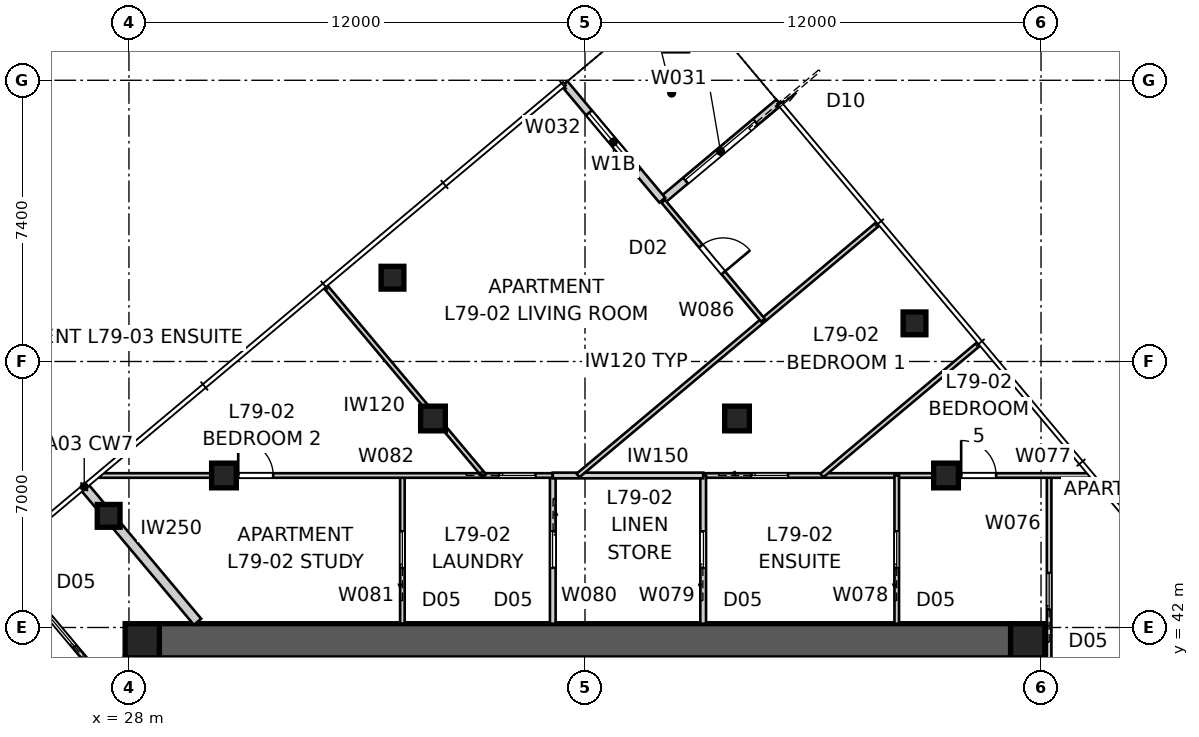
"""IFC4 building model, lengths in metres.
Left out: names, types, materials, properties, quantities, classifications, styles, units other than length and angle.
Written with IfcOpenShell. Run it as: python <this file> out.ifc"""

import sys

from ifc_helpers import new_model, si_unit, direction, frame, frame_2d, origin, origin_2d, place, context, subcontext, project, spatial, polyline, rectangle, outline, extrude, element, fill, save


model = new_model("IFC4")
c1 = context("Model", 3, precision=1e-05, world=origin(), true_north=direction((0.0, 1.0)))
c2 = subcontext(c1, "Body", "Model", "MODEL_VIEW")
j1 = project(units=[si_unit("LENGTHUNIT", "METRE"), si_unit("PLANEANGLEUNIT", "RADIAN")], contexts=[c1])
p1 = place(None, origin())
s1 = spatial("IfcSite", under=j1, at=p1, CompositionType="ELEMENT")
p2 = place(p1, origin())
s2 = spatial("IfcBuilding", under=s1, at=p2, CompositionType="ELEMENT")
p3 = place(p2, frame((0.0, 0.0, 286.2)))
s3 = spatial("IfcBuildingStorey", under=s2, at=p3, CompositionType="ELEMENT", Elevation=286.2)
p4 = place(p3, frame((28.8, 41.65, 0.0), z_axis=(0.0, 0.0, 1.0), x_axis=(1.0, 0.0, 0.0)))
e1 = element("IfcWall", 1, at=p4, inside=s3, PredefinedType="SHEAR", context=c2, shape_type="SweptSolid", body=[
    extrude(outline(polyline([(0.0, -0.45), (22.4, -0.45), (22.4, -0.025), (22.85, -0.025), (22.85, 0.025), (22.4, 0.025), (22.4, 0.45), (0.0, 0.45), (0.0, 0.025), (-0.45, 0.025), (-0.45, -0.025), (0.0, -0.025), (0.0, -0.45)])), origin(), (0.0, 0.0, 1.0), 3.4),
])
p5 = place(p3, frame((51.65, 18.8, 0.0), z_axis=(0.0, 0.0, 1.0), x_axis=(0.0, 1.0, 0.0)))
e2 = element("IfcWall", 2, at=p5, inside=s3, PredefinedType="SHEAR", context=c2, shape_type="SweptSolid", body=[
    extrude(outline(polyline([(0.0, -0.45), (22.4, -0.45), (22.4, -0.025), (22.85, -0.025), (22.85, 0.025), (22.4, 0.025), (22.4, 0.45), (0.0, 0.45), (0.0, 0.025), (-0.45, 0.025), (-0.45, -0.025), (0.0, -0.025), (0.0, -0.45)])), origin(), (0.0, 0.0, 1.0), 3.4),
])
p6 = place(p5, frame((11.14, 0.0, 0.0)))
e3 = element("IfcOpeningElement", 3, at=p6, cuts=e2, PredefinedType="OPENING", context=c2, shape_type="SweptSolid", body=[
    extrude(rectangle(XDim=1.02, YDim=2.4, at=frame_2d((0.51, 1.2))), frame((0.0, 0.46, 0.0), z_axis=(0.0, -1.0, 0.0), x_axis=(1.0, 0.0, 0.0)), (0.0, 0.0, 1.0), 0.92),
])
p7 = place(p3, frame((28.35, 41.2, 0.0), z_axis=(0.0, 0.0, 1.0), x_axis=(0.0, -1.0, 0.0)))
e4 = element("IfcWall", 4, at=p7, inside=s3, PredefinedType="SHEAR", context=c2, shape_type="SweptSolid", body=[
    extrude(outline(polyline([(0.0, -0.45), (22.4, -0.45), (22.4, -0.025), (22.85, -0.025), (22.85, 0.025), (22.4, 0.025), (22.4, 0.45), (0.0, 0.45), (0.0, 0.025), (-0.45, 0.025), (-0.45, -0.025), (0.0, -0.025), (0.0, -0.45)])), origin(), (0.0, 0.0, 1.0), 3.4),
])
p8 = place(p7, frame((11.14, 0.0, 0.0)))
e5 = element("IfcOpeningElement", 5, at=p8, cuts=e4, PredefinedType="OPENING", context=c2, shape_type="SweptSolid", body=[
    extrude(rectangle(XDim=1.02, YDim=2.4, at=frame_2d((0.51, 1.2))), frame((0.0, 0.46, 0.0), z_axis=(0.0, -1.0, 0.0), x_axis=(1.0, 0.0, 0.0)), (0.0, 0.0, 1.0), 0.92),
])
for number, where, z_axis, x_axis in (
    (6, (51.65, 41.65, 0.0), (0.0, 0.0, 1.0), (1.0, 0.0, 0.0)),
    (7, (28.35, 41.65, 0.0), (0.0, 0.0, 1.0), (1.0, 0.0, 0.0)),
):
    element("IfcColumn", number, at=place(p3, frame(where, z_axis=z_axis, x_axis=x_axis)), inside=s3, PredefinedType="COLUMN", context=c2, shape_type="SweptSolid", body=[
        extrude(rectangle(XDim=0.9, YDim=0.9, at=origin_2d()), origin(), (0.0, 0.0, 1.0), 3.4),
    ])
for number, where, z_axis, x_axis in (
    (8, (48.671, 50.003, 0.0), (0.0, 0.0, 1.0), (1.0, 0.0, 0.0)),
    (9, (34.935, 51.205, 0.0), (0.0, 0.0, 1.0), (1.0, 0.0, 0.0)),
    (10, (27.466, 44.938, 0.0), (0.0, 0.0, 1.0), (1.0, 0.0, 0.0)),
):
    element("IfcColumn", number, at=place(p3, frame(where, z_axis=z_axis, x_axis=x_axis)), inside=s3, PredefinedType="COLUMN", context=c2, shape_type="SweptSolid", body=[
        extrude(rectangle(XDim=0.6, YDim=0.6, at=origin_2d()), origin(), (0.0, 0.0, 1.0), 3.4),
    ])
for number, where, z_axis, x_axis in (
    (11, (49.5, 46.0, 0.0), (0.0, 0.0, 1.0), (1.0, 0.0, 0.0)),
    (12, (44.0, 47.5, 0.0), (0.0, 0.0, 1.0), (1.0, 0.0, 0.0)),
    (13, (36.0, 47.5, 0.0), (0.0, 0.0, 1.0), (1.0, 0.0, 0.0)),
    (14, (30.5, 46.0, 0.0), (0.0, 0.0, 1.0), (1.0, 0.0, 0.0)),
):
    element("IfcColumn", number, at=place(p3, frame(where, z_axis=z_axis, x_axis=x_axis)), inside=s3, PredefinedType="COLUMN", context=c2, shape_type="SweptSolid", body=[
        extrude(rectangle(XDim=0.65, YDim=0.65, at=origin_2d()), origin(), (0.0, 0.0, 1.0), 3.4),
    ])
p9 = place(p3, frame((45.098, 55.817, 0.0), z_axis=(0.0, 0.0, 1.0), x_axis=(-0.766060656284, -0.642768287094, 0.0)))
e15 = element("IfcWall", 15, at=p9, inside=s3, PredefinedType="SOLIDWALL", context=c2, shape_type="SweptSolid", body=[
    extrude(rectangle(XDim=4.0, YDim=0.2, at=frame_2d((2.0, 0.0))), origin(), (0.0, 0.0, 1.0), 3.25),
])
p10 = place(p9, frame((0.8, 0.0, 0.0)))
e16 = element("IfcOpeningElement", 16, at=p10, cuts=e15, PredefinedType="OPENING", context=c2, shape_type="SweptSolid", body=[
    extrude(rectangle(XDim=2.4, YDim=2.4, at=frame_2d((1.2, 1.2))), frame((0.0, 0.11, 0.0), z_axis=(0.0, -1.0, 0.0), x_axis=(1.0, 0.0, 0.0)), (0.0, 0.0, 1.0), 0.22),
])
p11 = place(p3, frame((42.034, 53.246, 0.0), z_axis=(0.0, 0.0, 1.0), x_axis=(-0.642798342015, 0.766035437498, 0.0)))
e17 = element("IfcWall", 17, at=p11, inside=s3, PredefinedType="SOLIDWALL", context=c2, shape_type="SweptSolid", body=[
    extrude(rectangle(XDim=4.0, YDim=0.2, at=frame_2d((2.0, 0.0))), origin(), (0.0, 0.0, 1.0), 3.25),
])
p12 = place(p11, frame((1.0, 0.0, 0.45)))
e18 = element("IfcOpeningElement", 18, at=p12, cuts=e17, PredefinedType="OPENING", context=c2, shape_type="SweptSolid", body=[
    extrude(rectangle(XDim=2.0, YDim=1.8, at=frame_2d((1.0, 0.9))), frame((0.0, 0.11, 0.0), z_axis=(0.0, -1.0, 0.0), x_axis=(1.0, 0.0, 0.0)), (0.0, 0.0, 1.0), 0.22),
])
p13 = place(p3, frame((26.823, 45.704, 0.0), z_axis=(0.0, 0.0, 1.0), x_axis=(0.64279957712, -0.76603440109, 0.0)))
e19 = element("IfcWall", 19, at=p13, inside=s3, PredefinedType="PARTITIONING", context=c2, shape_type="SweptSolid", body=[
    extrude(rectangle(XDim=4.64, YDim=0.25, at=frame_2d((2.32, 0.0))), origin(), (0.0, 0.0, 1.0), 3.25),
])
p14 = place(p3, frame((52.213, 39.914, 0.0), z_axis=(0.0, 0.0, 1.0), x_axis=(0.0, 1.0, 0.0)))
e20 = element("IfcWall", 20, at=p14, inside=s3, PredefinedType="PARTITIONING", context=c2, shape_type="SweptSolid", body=[
    extrude(rectangle(XDim=6.086, YDim=0.12, at=frame_2d((3.043, 0.0))), origin(), (0.0, 0.0, 1.0), 3.25),
])
p15 = place(p14, frame((2.563, 0.0, 0.0)))
e21 = element("IfcOpeningElement", 21, at=p15, cuts=e20, PredefinedType="OPENING", context=c2, shape_type="SweptSolid", body=[
    extrude(rectangle(XDim=0.96, YDim=2.1, at=frame_2d((0.48, 1.05))), frame((0.0, 0.07, 0.0), z_axis=(0.0, -1.0, 0.0), x_axis=(1.0, 0.0, 0.0)), (0.0, 0.0, 1.0), 0.14),
])
p16 = place(p3, frame((43.11, 46.0, 0.0), z_axis=(0.0, 0.0, 1.0), x_axis=(1.0, 0.0, 0.0)))
e22 = element("IfcWall", 22, at=p16, inside=s3, PredefinedType="PARTITIONING", context=c2, shape_type="SweptSolid", body=[
    extrude(rectangle(XDim=10.173, YDim=0.12, at=frame_2d((5.086, 0.0))), origin(), (0.0, 0.0, 1.0), 2.55),
])
p17 = place(p16, frame((6.788, 0.0, 0.0)))
e23 = element("IfcOpeningElement", 23, at=p17, cuts=e22, PredefinedType="OPENING", context=c2, shape_type="SweptSolid", body=[
    extrude(rectangle(XDim=0.92, YDim=2.34, at=frame_2d((0.46, 1.17))), frame((0.0, 0.07, 0.0), z_axis=(0.0, -1.0, 0.0), x_axis=(1.0, 0.0, 0.0)), (0.0, 0.0, 1.0), 0.14),
])
p18 = place(p16, frame((1.271, 0.0, 0.0)))
e24 = element("IfcOpeningElement", 24, at=p18, cuts=e22, PredefinedType="OPENING", context=c2, shape_type="SweptSolid", body=[
    extrude(rectangle(XDim=0.96, YDim=2.1, at=frame_2d((0.48, 1.05))), frame((0.0, 0.07, 0.0), z_axis=(0.0, -1.0, 0.0), x_axis=(1.0, 0.0, 0.0)), (0.0, 0.0, 1.0), 0.14),
])
p19 = place(p3, frame((48.203, 42.1, 0.0), z_axis=(0.0, 0.0, 1.0), x_axis=(0.0, 1.0, 0.0)))
e25 = element("IfcWall", 25, at=p19, inside=s3, PredefinedType="PARTITIONING", context=c2, shape_type="SweptSolid", body=[
    extrude(rectangle(XDim=3.9, YDim=0.12, at=frame_2d((1.95, 0.0))), origin(), (0.0, 0.0, 1.0), 3.25),
])
p20 = place(p19, frame((1.47, 0.0, 0.0)))
e26 = element("IfcOpeningElement", 26, at=p20, cuts=e25, PredefinedType="OPENING", context=c2, shape_type="SweptSolid", body=[
    extrude(rectangle(XDim=0.96, YDim=2.1, at=frame_2d((0.48, 1.05))), frame((0.0, 0.07, 0.0), z_axis=(0.0, -1.0, 0.0), x_axis=(1.0, 0.0, 0.0)), (0.0, 0.0, 1.0), 0.14),
])
p21 = place(p3, frame((43.11, 42.1, 0.0), z_axis=(0.0, 0.0, 1.0), x_axis=(0.0, 1.0, 0.0)))
e27 = element("IfcWall", 27, at=p21, inside=s3, PredefinedType="SOLIDWALL", context=c2, shape_type="SweptSolid", body=[
    extrude(rectangle(XDim=3.9, YDim=0.15, at=frame_2d((1.95, 0.0))), origin(), (0.0, 0.0, 1.0), 3.25),
])
p22 = place(p21, frame((1.47, 0.0, 0.0)))
e28 = element("IfcOpeningElement", 28, at=p22, cuts=e27, PredefinedType="OPENING", context=c2, shape_type="SweptSolid", body=[
    extrude(rectangle(XDim=0.96, YDim=2.1, at=frame_2d((0.48, 1.05))), frame((0.0, 0.085, 0.0), z_axis=(0.0, -1.0, 0.0), x_axis=(1.0, 0.0, 0.0)), (0.0, 0.0, 1.0), 0.17),
])
p23 = place(p3, frame((39.153, 46.0, 0.0), z_axis=(0.0, 0.0, 1.0), x_axis=(0.0, -1.0, 0.0)))
e29 = element("IfcWall", 29, at=p23, inside=s3, PredefinedType="SOLIDWALL", context=c2, shape_type="SweptSolid", body=[
    extrude(rectangle(XDim=3.9, YDim=0.15, at=frame_2d((1.95, 0.0))), origin(), (0.0, 0.0, 1.0), 3.25),
])
p24 = place(p23, frame((1.47, 0.0, 0.0)))
e30 = element("IfcOpeningElement", 30, at=p24, cuts=e29, PredefinedType="OPENING", context=c2, shape_type="SweptSolid", body=[
    extrude(rectangle(XDim=0.96, YDim=2.1, at=frame_2d((0.48, 1.05))), frame((0.0, 0.085, 0.0), z_axis=(0.0, -1.0, 0.0), x_axis=(1.0, 0.0, 0.0)), (0.0, 0.0, 1.0), 0.17),
])
p25 = place(p3, frame((35.195, 42.1, 0.0), z_axis=(0.0, 0.0, 1.0), x_axis=(0.0, 1.0, 0.0)))
e31 = element("IfcWall", 31, at=p25, inside=s3, PredefinedType="PARTITIONING", context=c2, shape_type="SweptSolid", body=[
    extrude(rectangle(XDim=3.9, YDim=0.12, at=frame_2d((1.95, 0.0))), origin(), (0.0, 0.0, 1.0), 3.25),
])
p26 = place(p25, frame((1.47, 0.0, 0.0)))
e32 = element("IfcOpeningElement", 32, at=p26, cuts=e31, PredefinedType="OPENING", context=c2, shape_type="SweptSolid", body=[
    extrude(rectangle(XDim=0.96, YDim=2.1, at=frame_2d((0.48, 1.05))), frame((0.0, 0.07, 0.0), z_axis=(0.0, -1.0, 0.0), x_axis=(1.0, 0.0, 0.0)), (0.0, 0.0, 1.0), 0.14),
])
p27 = place(p3, frame((27.238, 46.0, 0.0), z_axis=(0.0, 0.0, 1.0), x_axis=(1.0, 0.0, 0.0)))
e33 = element("IfcWall", 33, at=p27, inside=s3, PredefinedType="PARTITIONING", context=c2, shape_type="SweptSolid", body=[
    extrude(rectangle(XDim=11.915, YDim=0.12, at=frame_2d((5.957, 0.0))), origin(), (0.0, 0.0, 1.0), 2.55),
])
p28 = place(p27, frame((3.637, 0.0, 0.0)))
e34 = element("IfcOpeningElement", 34, at=p28, cuts=e33, PredefinedType="OPENING", context=c2, shape_type="SweptSolid", body=[
    extrude(rectangle(XDim=0.92, YDim=2.34, at=frame_2d((0.46, 1.17))), frame((0.0, 0.07, 0.0), z_axis=(0.0, -1.0, 0.0), x_axis=(1.0, 0.0, 0.0)), (0.0, 0.0, 1.0), 0.14),
])
p29 = place(p27, frame((10.498, 0.0, 0.0)))
e35 = element("IfcOpeningElement", 35, at=p29, cuts=e33, PredefinedType="OPENING", context=c2, shape_type="SweptSolid", body=[
    extrude(rectangle(XDim=0.96, YDim=2.1, at=frame_2d((0.48, 1.05))), frame((0.0, 0.07, 0.0), z_axis=(0.0, -1.0, 0.0), x_axis=(1.0, 0.0, 0.0)), (0.0, 0.0, 1.0), 0.14),
])
p30 = place(p3, frame((39.153, 46.0, 0.0), z_axis=(0.0, 0.0, 1.0), x_axis=(1.0, 0.0, 0.0)))
e36 = element("IfcWall", 36, at=p30, inside=s3, PredefinedType="SOLIDWALL", context=c2, shape_type="SweptSolid", body=[
    extrude(rectangle(XDim=3.958, YDim=0.15, at=frame_2d((1.979, 0.0))), origin(), (0.0, 0.0, 1.0), 3.25),
])
p31 = place(p3, frame((47.719, 52.631, 0.0), z_axis=(0.0, 0.0, 1.0), x_axis=(-0.766052076481, -0.64277851249, 0.0)))
e37 = element("IfcWall", 37, at=p31, inside=s3, PredefinedType="PARTITIONING", context=c2, shape_type="SweptSolid", body=[
    extrude(rectangle(XDim=10.316, YDim=0.12, at=frame_2d((5.158, 0.0))), origin(), (0.0, 0.0, 1.0), 3.25),
])
p32 = place(p3, frame((37.344, 46.0, 0.0), z_axis=(0.0, 0.0, 1.0), x_axis=(-0.642779498388, 0.766051249233, 0.0)))
e38 = element("IfcWall", 38, at=p32, inside=s3, PredefinedType="PARTITIONING", context=c2, shape_type="SweptSolid", body=[
    extrude(rectangle(XDim=6.496, YDim=0.12, at=frame_2d((3.248, 0.0))), origin(), (0.0, 0.0, 1.0), 3.25),
])
p33 = place(p3, frame((42.06, 53.215, 0.0), z_axis=(0.0, 0.0, 1.0), x_axis=(0.642796729538, -0.766036790562, 0.0)))
e39 = element("IfcWall", 39, at=p33, inside=s3, PredefinedType="PARTITIONING", context=c2, shape_type="SweptSolid", body=[
    extrude(rectangle(XDim=4.085, YDim=0.12, at=frame_2d((2.042, 0.0))), origin(), (0.0, 0.0, 1.0), 3.25),
])
p34 = place(p33, frame((1.538, 0.0, 0.0)))
e40 = element("IfcOpeningElement", 40, at=p34, cuts=e39, PredefinedType="OPENING", context=c2, shape_type="SweptSolid", body=[
    extrude(rectangle(XDim=0.92, YDim=2.34, at=frame_2d((0.46, 1.17))), frame((0.0, 0.07, 0.0), z_axis=(0.0, -1.0, 0.0), x_axis=(1.0, 0.0, 0.0)), (0.0, 0.0, 1.0), 0.14),
])
p35 = place(p3, frame((50.37, 49.471, 0.0), z_axis=(0.0, 0.0, 1.0), x_axis=(-0.766056536168, -0.642773197476, 0.0)))
e41 = element("IfcWall", 41, at=p35, inside=s3, PredefinedType="PARTITIONING", context=c2, shape_type="SweptSolid", body=[
    extrude(rectangle(XDim=5.4, YDim=0.12, at=frame_2d((2.7, 0.0))), origin(), (0.0, 0.0, 1.0), 3.25),
])
p36 = place(p3, frame((27.9, 39.913, 0.0), z_axis=(0.0, 0.0, 1.0), x_axis=(-0.64279031777, 0.766042170759, 0.0)))
e42 = element("IfcWall", 42, at=p36, inside=s3, PredefinedType="PARTITIONING", context=c2, shape_type="SweptSolid", body=[
    extrude(rectangle(XDim=5.089, YDim=0.12, at=frame_2d((2.544, 0.0))), origin(), (0.0, 0.0, 1.0), 3.25),
])
p37 = place(p36, frame((2.084, 0.0, 0.0)))
e43 = element("IfcOpeningElement", 43, at=p37, cuts=e42, PredefinedType="OPENING", context=c2, shape_type="SweptSolid", body=[
    extrude(rectangle(XDim=0.96, YDim=2.1, at=frame_2d((0.48, 1.05))), frame((0.0, 0.07, 0.0), z_axis=(0.0, -1.0, 0.0), x_axis=(1.0, 0.0, 0.0)), (0.0, 0.0, 1.0), 0.14),
])
p38 = place(p10, origin())
e44 = element("IfcDoor", 44, at=p38, inside=s3, OperationType="SLIDING_TO_LEFT", PredefinedType="DOOR", context=c2, shape_type="SweptSolid", body=[
    extrude(rectangle(XDim=2.4, YDim=2.4, at=frame_2d((1.2, 1.2))), frame((0.0, 0.025, 0.0), z_axis=(0.0, -1.0, 0.0), x_axis=(1.0, 0.0, 0.0)), (0.0, 0.0, 1.0), 0.05),
])
fill(e16, e44)
p39 = place(p12, origin())
e45 = element("IfcWindow", 45, at=p39, inside=s3, PartitioningType="SINGLE_PANEL", PredefinedType="WINDOW", context=c2, shape_type="SweptSolid", body=[
    extrude(rectangle(XDim=2.0, YDim=1.8, at=frame_2d((1.0, 0.9))), frame((0.0, 0.03, 0.0), z_axis=(0.0, -1.0, 0.0), x_axis=(1.0, 0.0, 0.0)), (0.0, 0.0, 1.0), 0.06),
])
fill(e18, e45)
p40 = place(p15, origin())
e46 = element("IfcDoor", 46, at=p40, inside=s3, OperationType="SLIDING_TO_LEFT", PredefinedType="DOOR", context=c2, shape_type="SweptSolid", body=[
    extrude(rectangle(XDim=0.96, YDim=2.1, at=frame_2d((0.48, 1.05))), frame((0.0, 0.025, 0.0), z_axis=(0.0, -1.0, 0.0), x_axis=(1.0, 0.0, 0.0)), (0.0, 0.0, 1.0), 0.05),
])
fill(e21, e46)
p41 = place(p17, origin())
e47 = element("IfcDoor", 47, at=p41, inside=s3, OperationType="SINGLE_SWING_LEFT", PredefinedType="DOOR", context=c2, shape_type="SweptSolid", body=[
    extrude(rectangle(XDim=0.92, YDim=2.34, at=frame_2d((0.46, 1.17))), frame((0.0, 0.025, 0.0), z_axis=(0.0, -1.0, 0.0), x_axis=(1.0, 0.0, 0.0)), (0.0, 0.0, 1.0), 0.05),
])
fill(e23, e47)
p42 = place(p20, origin())
e48 = element("IfcDoor", 48, at=p42, inside=s3, OperationType="SLIDING_TO_LEFT", PredefinedType="DOOR", context=c2, shape_type="SweptSolid", body=[
    extrude(rectangle(XDim=0.96, YDim=2.1, at=frame_2d((0.48, 1.05))), frame((0.0, 0.025, 0.0), z_axis=(0.0, -1.0, 0.0), x_axis=(1.0, 0.0, 0.0)), (0.0, 0.0, 1.0), 0.05),
])
fill(e26, e48)
p43 = place(p37, origin())
e49 = element("IfcDoor", 49, at=p43, inside=s3, OperationType="SLIDING_TO_LEFT", PredefinedType="DOOR", context=c2, shape_type="SweptSolid", body=[
    extrude(rectangle(XDim=0.96, YDim=2.1, at=frame_2d((0.48, 1.05))), frame((0.0, 0.025, 0.0), z_axis=(0.0, -1.0, 0.0), x_axis=(1.0, 0.0, 0.0)), (0.0, 0.0, 1.0), 0.05),
])
fill(e43, e49)
p44 = place(p22, origin())
e50 = element("IfcDoor", 50, at=p44, inside=s3, OperationType="SLIDING_TO_LEFT", PredefinedType="DOOR", context=c2, shape_type="SweptSolid", body=[
    extrude(rectangle(XDim=0.96, YDim=2.1, at=frame_2d((0.48, 1.05))), frame((0.0, 0.025, 0.0), z_axis=(0.0, -1.0, 0.0), x_axis=(1.0, 0.0, 0.0)), (0.0, 0.0, 1.0), 0.05),
])
fill(e28, e50)
p45 = place(p18, origin())
e51 = element("IfcDoor", 51, at=p45, inside=s3, OperationType="SLIDING_TO_LEFT", PredefinedType="DOOR", context=c2, shape_type="SweptSolid", body=[
    extrude(rectangle(XDim=0.96, YDim=2.1, at=frame_2d((0.48, 1.05))), frame((0.0, 0.025, 0.0), z_axis=(0.0, -1.0, 0.0), x_axis=(1.0, 0.0, 0.0)), (0.0, 0.0, 1.0), 0.05),
])
fill(e24, e51)
p46 = place(p24, origin())
e52 = element("IfcDoor", 52, at=p46, inside=s3, OperationType="SLIDING_TO_LEFT", PredefinedType="DOOR", context=c2, shape_type="SweptSolid", body=[
    extrude(rectangle(XDim=0.96, YDim=2.1, at=frame_2d((0.48, 1.05))), frame((0.0, 0.025, 0.0), z_axis=(0.0, -1.0, 0.0), x_axis=(1.0, 0.0, 0.0)), (0.0, 0.0, 1.0), 0.05),
])
fill(e30, e52)
p47 = place(p26, origin())
e53 = element("IfcDoor", 53, at=p47, inside=s3, OperationType="SLIDING_TO_LEFT", PredefinedType="DOOR", context=c2, shape_type="SweptSolid", body=[
    extrude(rectangle(XDim=0.96, YDim=2.1, at=frame_2d((0.48, 1.05))), frame((0.0, 0.025, 0.0), z_axis=(0.0, -1.0, 0.0), x_axis=(1.0, 0.0, 0.0)), (0.0, 0.0, 1.0), 0.05),
])
fill(e32, e53)
p48 = place(p28, origin())
e54 = element("IfcDoor", 54, at=p48, inside=s3, OperationType="SINGLE_SWING_LEFT", PredefinedType="DOOR", context=c2, shape_type="SweptSolid", body=[
    extrude(rectangle(XDim=0.92, YDim=2.34, at=frame_2d((0.46, 1.17))), frame((0.0, 0.025, 0.0), z_axis=(0.0, -1.0, 0.0), x_axis=(1.0, 0.0, 0.0)), (0.0, 0.0, 1.0), 0.05),
])
fill(e34, e54)
p49 = place(p29, origin())
e55 = element("IfcDoor", 55, at=p49, inside=s3, OperationType="SLIDING_TO_LEFT", PredefinedType="DOOR", context=c2, shape_type="SweptSolid", body=[
    extrude(rectangle(XDim=0.96, YDim=2.1, at=frame_2d((0.48, 1.05))), frame((0.0, 0.025, 0.0), z_axis=(0.0, -1.0, 0.0), x_axis=(1.0, 0.0, 0.0)), (0.0, 0.0, 1.0), 0.05),
])
fill(e35, e55)
p50 = place(p34, origin())
e56 = element("IfcDoor", 56, at=p50, inside=s3, OperationType="SINGLE_SWING_RIGHT", PredefinedType="DOOR", context=c2, shape_type="SweptSolid", body=[
    extrude(rectangle(XDim=0.92, YDim=2.34, at=frame_2d((0.46, 1.17))), frame((0.0, 0.025, 0.0), z_axis=(0.0, -1.0, 0.0), x_axis=(1.0, 0.0, 0.0)), (0.0, 0.0, 1.0), 0.05),
])
fill(e40, e56)
save(model, sys.argv[1])
